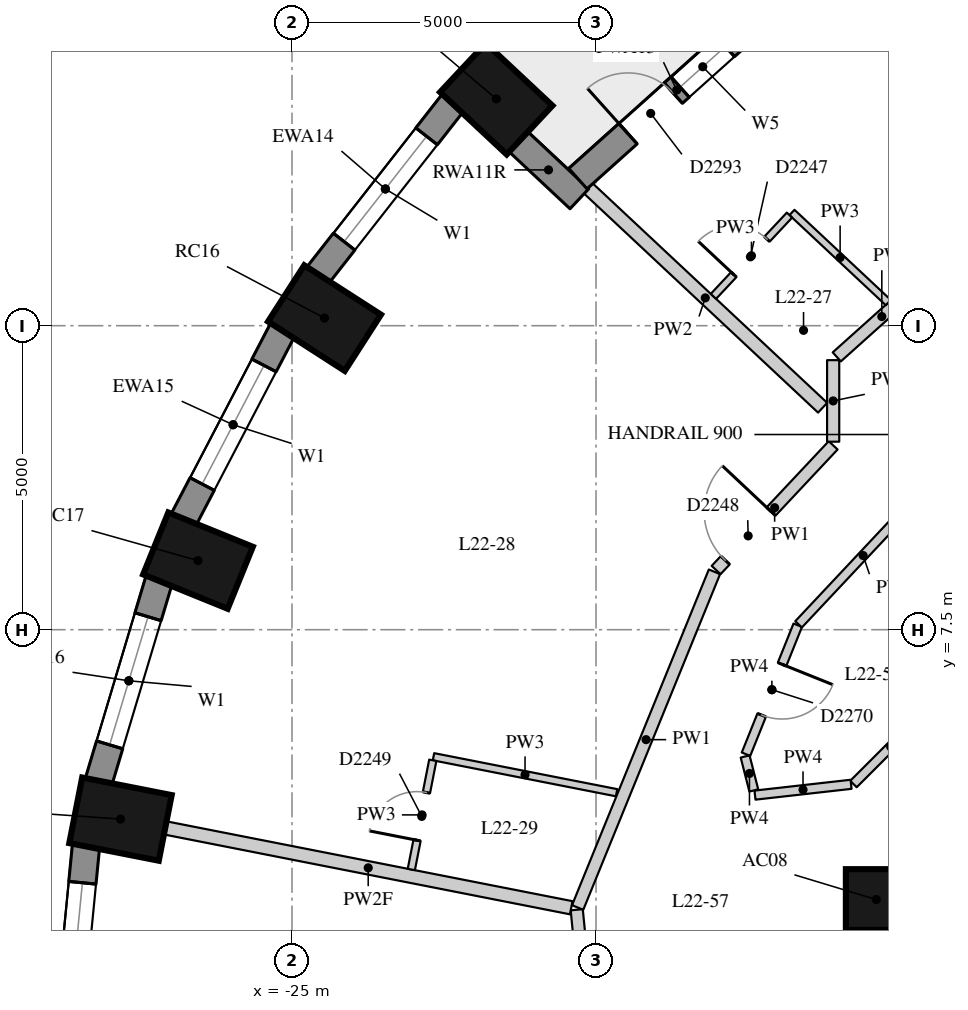
"""IFC4 building model, lengths in metres.
Left out: names, types, materials, properties, quantities, classifications, styles, units other than length and angle.
Written with IfcOpenShell. Run it as: python <this file> out.ifc"""

import sys

from ifc_helpers import new_model, si_unit, direction, frame, frame_2d, origin, origin_2d, place, context, subcontext, project, spatial, rectangle, extrude, element, fill, save


model = new_model("IFC4")
c1 = context("Model", 3, precision=1e-05, world=origin(), true_north=direction((0.0, 1.0)))
c2 = subcontext(c1, "Body", "Model", "MODEL_VIEW")
j1 = project(units=[si_unit("LENGTHUNIT", "METRE"), si_unit("PLANEANGLEUNIT", "RADIAN")], contexts=[c1])
p1 = place(None, origin())
s1 = spatial("IfcSite", under=j1, at=p1, CompositionType="ELEMENT")
p2 = place(p1, origin())
s2 = spatial("IfcBuilding", under=s1, at=p2, CompositionType="ELEMENT")
p3 = place(p2, frame((0.0, 0.0, 81.1)))
s3 = spatial("IfcBuildingStorey", under=s2, at=p3, CompositionType="ELEMENT", Elevation=81.1)
for number, where, z_axis, x_axis in (
    (1, (-21.641, 16.23, 0.0), (0.0, 0.0, 1.0), (-0.73, 0.683, 0.0)),
    (2, (-24.465, 12.625, 0.0), (0.0, 0.0, 1.0), (-0.841, 0.541, 0.0)),
    (3, (-26.546, 8.636, 0.0), (0.0, 0.0, 1.0), (-0.927, 0.376, 0.0)),
    (4, (-27.821, 4.385, 0.0), (0.0, 0.0, 1.0), (-0.981, 0.193, 0.0)),
):
    element("IfcColumn", number, at=place(p3, frame(where, z_axis=z_axis, x_axis=x_axis)), inside=s3, PredefinedType="COLUMN", context=c2, shape_type="SweptSolid", body=[
        extrude(rectangle(XDim=1.5, YDim=1.1, at=origin_2d()), origin(), (0.0, 0.0, 1.0), 3.3),
    ])
p4 = place(p3, frame((-15.391, 3.062, 0.0), z_axis=(0.0, 0.0, 1.0), x_axis=(1.0, 0.0, 0.0)))
e5 = element("IfcColumn", 5, at=p4, inside=s3, PredefinedType="COLUMN", context=c2, shape_type="SweptSolid", body=[
    extrude(rectangle(XDim=1.0, YDim=1.0, at=origin_2d()), origin(), (0.0, 0.0, 1.0), 3.3),
])
p5 = place(p3, frame((-22.352, 16.17, 0.0), z_axis=(0.0, 0.0, 1.0), x_axis=(-0.616661975264, -0.787228053529, 0.0)))
e6 = element("IfcWall", 6, at=p5, inside=s3, PredefinedType="SOLIDWALL", context=c2, shape_type="SweptSolid", body=[
    extrude(rectangle(XDim=3.61, YDim=0.45, at=frame_2d((1.805, 0.0))), origin(), (0.0, 0.0, 1.0), 2.85),
])
p6 = place(p5, frame((0.705, 0.0, 0.4)))
e7 = element("IfcOpeningElement", 7, at=p6, cuts=e6, PredefinedType="OPENING", context=c2, shape_type="SweptSolid", body=[
    extrude(rectangle(XDim=2.2, YDim=1.75, at=frame_2d((1.1, 0.875))), frame((0.0, 0.235, 0.0), z_axis=(0.0, -1.0, 0.0), x_axis=(1.0, 0.0, 0.0)), (0.0, 0.0, 1.0), 0.47),
])
p7 = place(p3, frame((-25.152, 12.437, 0.0), z_axis=(0.0, 0.0, 1.0), x_axis=(-0.462492775226, -0.886623050041, 0.0)))
e8 = element("IfcWall", 8, at=p7, inside=s3, PredefinedType="SOLIDWALL", context=c2, shape_type="SweptSolid", body=[
    extrude(rectangle(XDim=3.532, YDim=0.45, at=frame_2d((1.766, 0.0))), origin(), (0.0, 0.0, 1.0), 2.85),
])
p8 = place(p7, frame((0.666, 0.0, 0.4)))
e9 = element("IfcOpeningElement", 9, at=p8, cuts=e8, PredefinedType="OPENING", context=c2, shape_type="SweptSolid", body=[
    extrude(rectangle(XDim=2.2, YDim=1.75, at=frame_2d((1.1, 0.875))), frame((0.0, 0.235, 0.0), z_axis=(0.0, -1.0, 0.0), x_axis=(1.0, 0.0, 0.0)), (0.0, 0.0, 1.0), 0.47),
])
p9 = place(p3, frame((-27.185, 8.323, 0.0), z_axis=(0.0, 0.0, 1.0), x_axis=(-0.287064133733, -0.957911364963, 0.0)))
e10 = element("IfcWall", 10, at=p9, inside=s3, PredefinedType="SOLIDWALL", context=c2, shape_type="SweptSolid", body=[
    extrude(rectangle(XDim=3.473, YDim=0.45, at=frame_2d((1.737, 0.0))), origin(), (0.0, 0.0, 1.0), 2.85),
])
p10 = place(p9, frame((0.637, 0.0, 0.4)))
e11 = element("IfcOpeningElement", 11, at=p10, cuts=e10, PredefinedType="OPENING", context=c2, shape_type="SweptSolid", body=[
    extrude(rectangle(XDim=2.2, YDim=1.75, at=frame_2d((1.1, 0.875))), frame((0.0, 0.235, 0.0), z_axis=(0.0, -1.0, 0.0), x_axis=(1.0, 0.0, 0.0)), (0.0, 0.0, 1.0), 0.47),
])
p11 = place(p3, frame((-28.387, 3.956, 0.0), z_axis=(0.0, 0.0, 1.0), x_axis=(-0.097389581596, -0.995246336038, 0.0)))
e12 = element("IfcWall", 12, at=p11, inside=s3, PredefinedType="SOLIDWALL", context=c2, shape_type="SweptSolid", body=[
    extrude(rectangle(XDim=3.442, YDim=0.45, at=frame_2d((1.721, 0.0))), origin(), (0.0, 0.0, 1.0), 2.85),
])
p12 = place(p11, frame((0.621, 0.0, 0.4)))
e13 = element("IfcOpeningElement", 13, at=p12, cuts=e12, PredefinedType="OPENING", context=c2, shape_type="SweptSolid", body=[
    extrude(rectangle(XDim=2.2, YDim=1.75, at=frame_2d((1.1, 0.875))), frame((0.0, 0.235, 0.0), z_axis=(0.0, -1.0, 0.0), x_axis=(1.0, 0.0, 0.0)), (0.0, 0.0, 1.0), 0.47),
])
p13 = place(p3, frame((-21.289, 15.538, 0.0), z_axis=(0.0, 0.0, 1.0), x_axis=(0.730149942784, -0.683286953668, 0.0)))
e14 = element("IfcWall", 14, at=p13, inside=s3, PredefinedType="SOLIDWALL", context=c2, shape_type="SweptSolid", body=[
    extrude(rectangle(XDim=1.391, YDim=0.45, at=frame_2d((0.695, 0.0))), origin(), (0.0, 0.0, 1.0), 2.85),
])
p14 = place(p3, frame((-17.048, 17.832, 0.0), z_axis=(0.0, 0.0, 1.0), x_axis=(-0.744619286768, -0.667489413978, 0.0)))
e15 = element("IfcWall", 15, at=p14, inside=s3, PredefinedType="SOLIDWALL", context=c2, shape_type="SweptSolid", body=[
    extrude(rectangle(XDim=4.365, YDim=0.45, at=frame_2d((2.183, 0.0))), origin(), (0.0, 0.0, 1.0), 2.85),
])
p15 = place(p14, frame((1.107, 0.0, 0.4)))
e16 = element("IfcOpeningElement", 16, at=p15, cuts=e15, PredefinedType="OPENING", context=c2, shape_type="SweptSolid", body=[
    extrude(rectangle(XDim=1.0, YDim=1.75, at=frame_2d((0.5, 0.875))), frame((0.0, 0.235, 0.0), z_axis=(0.0, -1.0, 0.0), x_axis=(1.0, 0.0, 0.0)), (0.0, 0.0, 1.0), 0.47),
])
p16 = place(p14, frame((2.258, 0.0, 0.0)))
e17 = element("IfcOpeningElement", 17, at=p16, cuts=e15, PredefinedType="OPENING", context=c2, shape_type="SweptSolid", body=[
    extrude(rectangle(XDim=1.0, YDim=2.15, at=frame_2d((0.5, 1.075))), frame((0.0, 0.235, 0.0), z_axis=(0.0, -1.0, 0.0), x_axis=(1.0, 0.0, 0.0)), (0.0, 0.0, 1.0), 0.47),
])
p17 = place(p3, frame((-19.472, -5.693, 0.0), z_axis=(0.0, 0.0, 1.0), x_axis=(-0.097987963337, 0.995187599923, 0.0)))
e18 = element("IfcWall", 18, at=p17, inside=s3, PredefinedType="PARTITIONING", context=c2, shape_type="SweptSolid", body=[
    extrude(rectangle(XDim=8.628, YDim=0.2, at=frame_2d((4.314, 0.0))), origin(), (0.0, 0.0, 1.0), 2.85),
])
p18 = place(p17, frame((5.28, 0.0, 0.0)))
e19 = element("IfcOpeningElement", 19, at=p18, cuts=e18, PredefinedType="OPENING", context=c2, shape_type="SweptSolid", body=[
    extrude(rectangle(XDim=1.1, YDim=2.1, at=frame_2d((0.55, 1.05))), frame((0.0, 0.11, 0.0), z_axis=(0.0, -1.0, 0.0), x_axis=(1.0, 0.0, 0.0)), (0.0, 0.0, 1.0), 0.22),
])
p19 = place(p17, frame((0.896, 0.0, 0.0)))
e20 = element("IfcOpeningElement", 20, at=p19, cuts=e18, PredefinedType="OPENING", context=c2, shape_type="SweptSolid", body=[
    extrude(rectangle(XDim=0.9, YDim=2.1, at=frame_2d((0.45, 1.05))), frame((0.0, 0.11, 0.0), z_axis=(0.0, -1.0, 0.0), x_axis=(1.0, 0.0, 0.0)), (0.0, 0.0, 1.0), 0.22),
])
p20 = place(p3, frame((-20.302, 2.931, 0.0), z_axis=(0.0, 0.0, 1.0), x_axis=(0.377348916571, 0.926071160961, 0.0)))
e21 = element("IfcWall", 21, at=p20, inside=s3, PredefinedType="PARTITIONING", context=c2, shape_type="SweptSolid", body=[
    extrude(rectangle(XDim=5.962, YDim=0.2, at=frame_2d((2.981, 0.0))), origin(), (0.0, 0.0, 1.0), 2.85),
])
p21 = place(p3, frame((-18.025, 8.481, 0.0), z_axis=(0.0, 0.0, 1.0), x_axis=(0.684446266357, 0.729063308958, 0.0)))
e22 = element("IfcWall", 22, at=p21, inside=s3, PredefinedType="PARTITIONING", context=c2, shape_type="SweptSolid", body=[
    extrude(rectangle(XDim=2.812, YDim=0.2, at=frame_2d((1.406, 0.0))), origin(), (0.0, 0.0, 1.0), 2.85),
])
p22 = place(p21, frame((0.22, 0.0, 0.0)))
e23 = element("IfcOpeningElement", 23, at=p22, cuts=e22, PredefinedType="OPENING", context=c2, shape_type="SweptSolid", body=[
    extrude(rectangle(XDim=1.1, YDim=2.1, at=frame_2d((0.55, 1.05))), frame((0.0, 0.11, 0.0), z_axis=(0.0, -1.0, 0.0), x_axis=(1.0, 0.0, 0.0)), (0.0, 0.0, 1.0), 0.22),
])
p23 = place(p3, frame((-16.1, 10.592, 0.0), z_axis=(0.0, 0.0, 1.0), x_axis=(0.0, 1.0, 0.0)))
e24 = element("IfcWall", 24, at=p23, inside=s3, PredefinedType="PARTITIONING", context=c2, shape_type="SweptSolid", body=[
    extrude(rectangle(XDim=1.341, YDim=0.2, at=frame_2d((0.67, 0.0))), origin(), (0.0, 0.0, 1.0), 2.85),
])
p24 = place(p3, frame((-16.041, 11.987, 0.0), z_axis=(0.0, 0.0, 1.0), x_axis=(0.744714584968, 0.66738308859, 0.0)))
e25 = element("IfcWall", 25, at=p24, inside=s3, PredefinedType="PARTITIONING", context=c2, shape_type="SweptSolid", body=[
    extrude(rectangle(XDim=1.989, YDim=0.2, at=frame_2d((0.995, 0.0))), origin(), (0.0, 0.0, 1.0), 2.85),
])
p25 = place(p3, frame((-14.542, 6.186, 0.0), z_axis=(0.0, 0.0, 1.0), x_axis=(-0.707036257397, -0.707177297943, 0.0)))
e26 = element("IfcWall", 26, at=p25, inside=s3, PredefinedType="PARTITIONING", context=c2, shape_type="SweptSolid", body=[
    extrude(rectangle(XDim=1.731, YDim=0.15, at=frame_2d((0.865, 0.0))), origin(), (0.0, 0.0, 1.0), 2.85),
])
p26 = place(p3, frame((-15.806, 4.957, 0.0), z_axis=(0.0, 0.0, 1.0), x_axis=(-0.993714030989, -0.111948312253, 0.0)))
e27 = element("IfcWall", 27, at=p26, inside=s3, PredefinedType="PARTITIONING", context=c2, shape_type="SweptSolid", body=[
    extrude(rectangle(XDim=1.59, YDim=0.15, at=frame_2d((0.795, 0.0))), origin(), (0.0, 0.0, 1.0), 2.85),
])
p27 = place(p3, frame((-17.405, 4.856, 0.0), z_axis=(0.0, 0.0, 1.0), x_axis=(-0.247510009529, 0.968885336447, 0.0)))
e28 = element("IfcWall", 28, at=p27, inside=s3, PredefinedType="PARTITIONING", context=c2, shape_type="SweptSolid", body=[
    extrude(rectangle(XDim=0.577, YDim=0.15, at=frame_2d((0.289, 0.0))), origin(), (0.0, 0.0, 1.0), 2.85),
])
p28 = place(p3, frame((-17.533, 5.452, 0.0), z_axis=(0.0, 0.0, 1.0), x_axis=(0.372293007078, 0.928115249783, 0.0)))
e29 = element("IfcWall", 29, at=p28, inside=s3, PredefinedType="PARTITIONING", context=c2, shape_type="SweptSolid", body=[
    extrude(rectangle(XDim=2.285, YDim=0.15, at=frame_2d((1.143, 0.0))), origin(), (0.0, 0.0, 1.0), 2.85),
])
p29 = place(p28, frame((0.693, 0.0, 0.0)))
e30 = element("IfcOpeningElement", 30, at=p29, cuts=e29, PredefinedType="OPENING", context=c2, shape_type="SweptSolid", body=[
    extrude(rectangle(XDim=0.9, YDim=2.1, at=frame_2d((0.45, 1.05))), frame((0.0, 0.085, 0.0), z_axis=(0.0, -1.0, 0.0), x_axis=(1.0, 0.0, 0.0)), (0.0, 0.0, 1.0), 0.17),
])
p30 = place(p3, frame((-16.669, 7.588, 0.0), z_axis=(0.0, 0.0, 1.0), x_axis=(0.684493083222, 0.729019354353, 0.0)))
e31 = element("IfcWall", 31, at=p30, inside=s3, PredefinedType="PARTITIONING", context=c2, shape_type="SweptSolid", body=[
    extrude(rectangle(XDim=3.104, YDim=0.15, at=frame_2d((1.552, 0.0))), origin(), (0.0, 0.0, 1.0), 2.85),
])
p31 = place(p3, frame((-20.133, 14.764, 0.0), z_axis=(0.0, 0.0, 1.0), x_axis=(0.730064043032, -0.68337873326, 0.0)))
e32 = element("IfcWall", 32, at=p31, inside=s3, PredefinedType="PARTITIONING", context=c2, shape_type="SweptSolid", body=[
    extrude(rectangle(XDim=5.287, YDim=0.22, at=frame_2d((2.644, 0.0))), origin(), (0.0, 0.0, 1.0), 2.85),
])
p32 = place(p3, frame((-27.085, 4.24, 0.0), z_axis=(0.0, 0.0, 1.0), x_axis=(0.981200805451, -0.192989583608, 0.0)))
e33 = element("IfcWall", 33, at=p32, inside=s3, PredefinedType="PARTITIONING", context=c2, shape_type="SweptSolid", body=[
    extrude(rectangle(XDim=6.805, YDim=0.22, at=frame_2d((3.402, 0.0))), origin(), (0.0, 0.0, 1.0), 2.3),
])
p33 = place(p3, frame((-15.194, 12.88, 0.0), z_axis=(0.0, 0.0, 1.0), x_axis=(-0.730070370792, 0.683371973153, 0.0)))
e34 = element("IfcWall", 34, at=p33, inside=s3, PredefinedType="PARTITIONING", context=c2, shape_type="SweptSolid", body=[
    extrude(rectangle(XDim=2.17, YDim=0.12, at=frame_2d((1.085, 0.0))), origin(), (0.0, 0.0, 1.0), 2.85),
])
p34 = place(p3, frame((-19.662, 4.819, 0.0), z_axis=(0.0, 0.0, 1.0), x_axis=(-0.981227049162, 0.192856106963, 0.0)))
e35 = element("IfcWall", 35, at=p34, inside=s3, PredefinedType="PARTITIONING", context=c2, shape_type="SweptSolid", body=[
    extrude(rectangle(XDim=3.069, YDim=0.12, at=frame_2d((1.534, 0.0))), origin(), (0.0, 0.0, 1.0), 2.85),
])
p35 = place(p3, frame((-16.819, 14.319, 0.0), z_axis=(0.0, 0.0, 1.0), x_axis=(-0.683372850006, -0.730069550026, 0.0)))
e36 = element("IfcWall", 36, at=p35, inside=s3, PredefinedType="PARTITIONING", context=c2, shape_type="SweptSolid", body=[
    extrude(rectangle(XDim=1.83, YDim=0.12, at=frame_2d((0.915, 0.0))), origin(), (0.0, 0.0, 1.0), 2.85),
])
p36 = place(p35, frame((0.54, 0.0, 0.0)))
e37 = element("IfcOpeningElement", 37, at=p36, cuts=e36, PredefinedType="OPENING", context=c2, shape_type="SweptSolid", body=[
    extrude(rectangle(XDim=0.8, YDim=2.1, at=frame_2d((0.4, 1.05))), frame((0.0, 0.07, 0.0), z_axis=(0.0, -1.0, 0.0), x_axis=(1.0, 0.0, 0.0)), (0.0, 0.0, 1.0), 0.14),
])
p37 = place(p3, frame((-22.685, 5.352, 0.0), z_axis=(0.0, 0.0, 1.0), x_axis=(-0.192908160061, -0.981216816907, 0.0)))
e38 = element("IfcWall", 38, at=p37, inside=s3, PredefinedType="PARTITIONING", context=c2, shape_type="SweptSolid", body=[
    extrude(rectangle(XDim=1.83, YDim=0.12, at=frame_2d((0.915, 0.0))), origin(), (0.0, 0.0, 1.0), 2.85),
])
p38 = place(p37, frame((0.54, 0.0, 0.0)))
e39 = element("IfcOpeningElement", 39, at=p38, cuts=e38, PredefinedType="OPENING", context=c2, shape_type="SweptSolid", body=[
    extrude(rectangle(XDim=0.8, YDim=2.1, at=frame_2d((0.4, 1.05))), frame((0.0, 0.07, 0.0), z_axis=(0.0, -1.0, 0.0), x_axis=(1.0, 0.0, 0.0)), (0.0, 0.0, 1.0), 0.14),
])
p39 = place(p6, origin())
e40 = element("IfcWindow", 40, at=p39, inside=s3, PartitioningType="SINGLE_PANEL", PredefinedType="WINDOW", context=c2, shape_type="SweptSolid", body=[
    extrude(rectangle(XDim=2.2, YDim=1.75, at=frame_2d((1.1, 0.875))), frame((0.0, 0.035, 0.0), z_axis=(0.0, -1.0, 0.0), x_axis=(1.0, 0.0, 0.0)), (0.0, 0.0, 1.0), 0.06),
])
fill(e7, e40)
p40 = place(p8, origin())
e41 = element("IfcWindow", 41, at=p40, inside=s3, PartitioningType="SINGLE_PANEL", PredefinedType="WINDOW", context=c2, shape_type="SweptSolid", body=[
    extrude(rectangle(XDim=2.2, YDim=1.75, at=frame_2d((1.1, 0.875))), frame((0.0, 0.035, 0.0), z_axis=(0.0, -1.0, 0.0), x_axis=(1.0, 0.0, 0.0)), (0.0, 0.0, 1.0), 0.06),
])
fill(e9, e41)
p41 = place(p10, origin())
e42 = element("IfcWindow", 42, at=p41, inside=s3, PartitioningType="SINGLE_PANEL", PredefinedType="WINDOW", context=c2, shape_type="SweptSolid", body=[
    extrude(rectangle(XDim=2.2, YDim=1.75, at=frame_2d((1.1, 0.875))), frame((0.0, 0.035, 0.0), z_axis=(0.0, -1.0, 0.0), x_axis=(1.0, 0.0, 0.0)), (0.0, 0.0, 1.0), 0.06),
])
fill(e11, e42)
p42 = place(p12, origin())
e43 = element("IfcWindow", 43, at=p42, inside=s3, PartitioningType="SINGLE_PANEL", PredefinedType="WINDOW", context=c2, shape_type="SweptSolid", body=[
    extrude(rectangle(XDim=2.2, YDim=1.75, at=frame_2d((1.1, 0.875))), frame((0.0, 0.035, 0.0), z_axis=(0.0, -1.0, 0.0), x_axis=(1.0, 0.0, 0.0)), (0.0, 0.0, 1.0), 0.06),
])
fill(e13, e43)
p43 = place(p15, origin())
e44 = element("IfcWindow", 44, at=p43, inside=s3, PartitioningType="SINGLE_PANEL", PredefinedType="WINDOW", context=c2, shape_type="SweptSolid", body=[
    extrude(rectangle(XDim=1.0, YDim=1.75, at=frame_2d((0.5, 0.875))), frame((0.0, 0.035, 0.0), z_axis=(0.0, -1.0, 0.0), x_axis=(1.0, 0.0, 0.0)), (0.0, 0.0, 1.0), 0.06),
])
fill(e16, e44)
p44 = place(p16, frame((1.0, 0.0, 0.0), z_axis=(0.0, 0.0, 1.0), x_axis=(-1.0, 0.0, 0.0)))
e45 = element("IfcDoor", 45, at=p44, inside=s3, OperationType="SINGLE_SWING_LEFT", PredefinedType="DOOR", context=c2, shape_type="SweptSolid", body=[
    extrude(rectangle(XDim=1.0, YDim=2.15, at=frame_2d((0.5, 1.075))), frame((0.0, 0.075, 0.0), z_axis=(0.0, -1.0, 0.0), x_axis=(1.0, 0.0, 0.0)), (0.0, 0.0, 1.0), 0.05),
])
fill(e17, e45)
p45 = place(p36, origin())
e46 = element("IfcDoor", 46, at=p45, inside=s3, OperationType="SINGLE_SWING_LEFT", PredefinedType="DOOR", context=c2, shape_type="SweptSolid", body=[
    extrude(rectangle(XDim=0.8, YDim=2.1, at=frame_2d((0.4, 1.05))), frame((0.0, 0.025, 0.0), z_axis=(0.0, -1.0, 0.0), x_axis=(1.0, 0.0, 0.0)), (0.0, 0.0, 1.0), 0.05),
])
fill(e37, e46)
p46 = place(p22, origin())
e47 = element("IfcDoor", 47, at=p46, inside=s3, OperationType="SINGLE_SWING_RIGHT", PredefinedType="DOOR", context=c2, shape_type="SweptSolid", body=[
    extrude(rectangle(XDim=1.1, YDim=2.1, at=frame_2d((0.55, 1.05))), frame((0.0, 0.025, 0.0), z_axis=(0.0, -1.0, 0.0), x_axis=(1.0, 0.0, 0.0)), (0.0, 0.0, 1.0), 0.05),
])
fill(e23, e47)
p47 = place(p38, origin())
e48 = element("IfcDoor", 48, at=p47, inside=s3, OperationType="SINGLE_SWING_LEFT", PredefinedType="DOOR", context=c2, shape_type="SweptSolid", body=[
    extrude(rectangle(XDim=0.8, YDim=2.1, at=frame_2d((0.4, 1.05))), frame((0.0, 0.025, 0.0), z_axis=(0.0, -1.0, 0.0), x_axis=(1.0, 0.0, 0.0)), (0.0, 0.0, 1.0), 0.05),
])
fill(e39, e48)
p48 = place(p29, origin())
e49 = element("IfcDoor", 49, at=p48, inside=s3, OperationType="SINGLE_SWING_LEFT", PredefinedType="DOOR", context=c2, shape_type="SweptSolid", body=[
    extrude(rectangle(XDim=0.9, YDim=2.1, at=frame_2d((0.45, 1.05))), frame((0.0, 0.025, 0.0), z_axis=(0.0, -1.0, 0.0), x_axis=(1.0, 0.0, 0.0)), (0.0, 0.0, 1.0), 0.05),
])
fill(e30, e49)
save(model, sys.argv[1])
